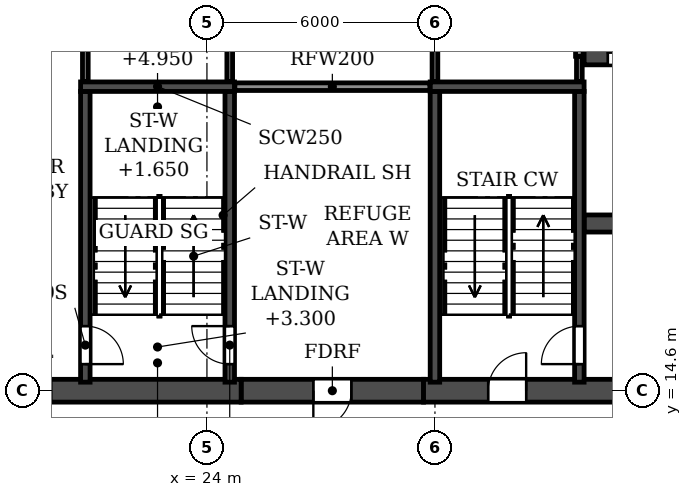
"""IFC4 building model, lengths in metres.
Left out: names, types, materials, properties, quantities, classifications, styles, units other than length and angle.
Written with IfcOpenShell. Run it as: python <this file> out.ifc"""

import sys

from ifc_helpers import new_model, si_unit, direction, frame, frame_2d, origin, place, context, subcontext, project, spatial, rectangle, extrude, element, fill, save


model = new_model("IFC4")
c1 = context("Model", 3, precision=1e-05, world=origin(), true_north=direction((0.0, 1.0)))
c2 = subcontext(c1, "Body", "Model", "MODEL_VIEW")
j1 = project(units=[si_unit("LENGTHUNIT", "METRE"), si_unit("PLANEANGLEUNIT", "RADIAN")], contexts=[c1])
p1 = place(None, origin())
s1 = spatial("IfcSite", under=j1, at=p1, CompositionType="ELEMENT")
p2 = place(p1, origin())
s2 = spatial("IfcBuilding", under=s1, at=p2, CompositionType="ELEMENT")
p3 = place(p2, frame((0.0, 0.0, 165.3)))
s3 = spatial("IfcBuildingStorey", under=s2, at=p3, CompositionType="ELEMENT", Elevation=165.3)
p4 = place(p3, frame((24.9, 14.6, 0.0), z_axis=(0.0, 0.0, 1.0), x_axis=(1.0, 0.0, 0.0)))
e1 = element("IfcWall", 1, at=p4, inside=s3, PredefinedType="SHEAR", context=c2, shape_type="SweptSolid", body=[
    extrude(rectangle(XDim=4.8, YDim=0.6, at=frame_2d((2.4, 0.0))), origin(), (0.0, 0.0, 1.0), 6.38),
])
p5 = place(p4, frame((1.9, 0.0, 0.0)))
e2 = element("IfcOpeningElement", 2, at=p5, cuts=e1, PredefinedType="OPENING", context=c2, shape_type="SweptSolid", body=[
    extrude(rectangle(XDim=1.0, YDim=2.1, at=frame_2d((0.5, 1.05))), frame((0.0, 0.31, 0.0), z_axis=(0.0, -1.0, 0.0), x_axis=(1.0, 0.0, 0.0)), (0.0, 0.0, 1.0), 0.62),
])
p6 = place(p3, frame((18.2, 14.6, 0.0), z_axis=(0.0, 0.0, 1.0), x_axis=(1.0, 0.0, 0.0)))
e3 = element("IfcWall", 3, at=p6, inside=s3, PredefinedType="SOLIDWALL", context=c2, shape_type="SweptSolid", body=[
    extrude(rectangle(XDim=6.7, YDim=0.6, at=frame_2d((3.35, 0.0))), origin(), (0.0, 0.0, 1.0), 6.38),
])
p7 = place(p6, frame((0.7, 0.0, 0.0)))
e4 = element("IfcOpeningElement", 4, at=p7, cuts=e3, PredefinedType="OPENING", context=c2, shape_type="SweptSolid", body=[
    extrude(rectangle(XDim=1.0, YDim=2.1, at=frame_2d((0.5, 1.05))), frame((0.0, 0.31, 0.0), z_axis=(0.0, -1.0, 0.0), x_axis=(1.0, 0.0, 0.0)), (0.0, 0.0, 1.0), 0.62),
])
p8 = place(p3, frame((29.7, 14.6, 0.0), z_axis=(0.0, 0.0, 1.0), x_axis=(1.0, 0.0, 0.0)))
e5 = element("IfcWall", 5, at=p8, inside=s3, PredefinedType="SOLIDWALL", context=c2, shape_type="SweptSolid", body=[
    extrude(rectangle(XDim=42.6, YDim=0.6, at=frame_2d((21.3, 0.0))), origin(), (0.0, 0.0, 1.0), 6.38),
])
p9 = place(p8, frame((1.7, 0.0, 0.0)))
e6 = element("IfcOpeningElement", 6, at=p9, cuts=e5, PredefinedType="OPENING", context=c2, shape_type="SweptSolid", body=[
    extrude(rectangle(XDim=1.0, YDim=2.1, at=frame_2d((0.5, 1.05))), frame((0.0, 0.31, 0.0), z_axis=(0.0, -1.0, 0.0), x_axis=(1.0, 0.0, 0.0)), (0.0, 0.0, 1.0), 0.62),
])
p10 = place(p8, frame((13.0, 0.0, 0.0)))
e7 = element("IfcOpeningElement", 7, at=p10, cuts=e5, PredefinedType="OPENING", context=c2, shape_type="SweptSolid", body=[
    extrude(rectangle(XDim=1.0, YDim=2.1, at=frame_2d((0.5, 1.05))), frame((0.0, 0.31, 0.0), z_axis=(0.0, -1.0, 0.0), x_axis=(1.0, 0.0, 0.0)), (0.0, 0.0, 1.0), 0.62),
])
p11 = place(p8, frame((16.9, 0.0, 0.0)))
e8 = element("IfcOpeningElement", 8, at=p11, cuts=e5, PredefinedType="OPENING", context=c2, shape_type="SweptSolid", body=[
    extrude(rectangle(XDim=1.0, YDim=2.1, at=frame_2d((0.5, 1.05))), frame((0.0, 0.31, 0.0), z_axis=(0.0, -1.0, 0.0), x_axis=(1.0, 0.0, 0.0)), (0.0, 0.0, 1.0), 0.62),
])
p12 = place(p8, frame((20.8, 0.0, 0.0)))
e9 = element("IfcOpeningElement", 9, at=p12, cuts=e5, PredefinedType="OPENING", context=c2, shape_type="SweptSolid", body=[
    extrude(rectangle(XDim=1.0, YDim=2.1, at=frame_2d((0.5, 1.05))), frame((0.0, 0.31, 0.0), z_axis=(0.0, -1.0, 0.0), x_axis=(1.0, 0.0, 0.0)), (0.0, 0.0, 1.0), 0.62),
])
p13 = place(p8, frame((24.7, 0.0, 0.0)))
e10 = element("IfcOpeningElement", 10, at=p13, cuts=e5, PredefinedType="OPENING", context=c2, shape_type="SweptSolid", body=[
    extrude(rectangle(XDim=1.0, YDim=2.1, at=frame_2d((0.5, 1.05))), frame((0.0, 0.31, 0.0), z_axis=(0.0, -1.0, 0.0), x_axis=(1.0, 0.0, 0.0)), (0.0, 0.0, 1.0), 0.62),
])
p14 = place(p8, frame((28.6, 0.0, 0.0)))
e11 = element("IfcOpeningElement", 11, at=p14, cuts=e5, PredefinedType="OPENING", context=c2, shape_type="SweptSolid", body=[
    extrude(rectangle(XDim=1.0, YDim=2.1, at=frame_2d((0.5, 1.05))), frame((0.0, 0.31, 0.0), z_axis=(0.0, -1.0, 0.0), x_axis=(1.0, 0.0, 0.0)), (0.0, 0.0, 1.0), 0.62),
])
p15 = place(p8, frame((39.9, 0.0, 0.0)))
e12 = element("IfcOpeningElement", 12, at=p15, cuts=e5, PredefinedType="OPENING", context=c2, shape_type="SweptSolid", body=[
    extrude(rectangle(XDim=1.0, YDim=2.1, at=frame_2d((0.5, 1.05))), frame((0.0, 0.31, 0.0), z_axis=(0.0, -1.0, 0.0), x_axis=(1.0, 0.0, 0.0)), (0.0, 0.0, 1.0), 0.62),
])
p16 = place(p3, frame((33.925, 19.0, 0.0), z_axis=(0.0, 0.0, 1.0), x_axis=(1.0, 0.0, 0.0)))
e13 = element("IfcWall", 13, at=p16, inside=s3, PredefinedType="SOLIDWALL", context=c2, shape_type="SweptSolid", body=[
    extrude(rectangle(XDim=34.15, YDim=0.45, at=frame_2d((17.075, 0.0))), origin(), (0.0, 0.0, 1.0), 6.38),
])
p17 = place(p16, frame((16.175, 0.0, 0.0)))
e14 = element("IfcOpeningElement", 14, at=p17, cuts=e13, PredefinedType="OPENING", context=c2, shape_type="SweptSolid", body=[
    extrude(rectangle(XDim=1.8, YDim=2.1, at=frame_2d((0.9, 1.05))), frame((0.0, 0.235, 0.0), z_axis=(0.0, -1.0, 0.0), x_axis=(1.0, 0.0, 0.0)), (0.0, 0.0, 1.0), 0.47),
])
p18 = place(p16, frame((1.525, 0.0, 0.0)))
e15 = element("IfcOpeningElement", 15, at=p18, cuts=e13, PredefinedType="OPENING", context=c2, shape_type="SweptSolid", body=[
    extrude(rectangle(XDim=1.8, YDim=2.1, at=frame_2d((0.9, 1.05))), frame((0.0, 0.235, 0.0), z_axis=(0.0, -1.0, 0.0), x_axis=(1.0, 0.0, 0.0)), (0.0, 0.0, 1.0), 0.47),
])
p19 = place(p16, frame((30.825, 0.0, 0.0)))
e16 = element("IfcOpeningElement", 16, at=p19, cuts=e13, PredefinedType="OPENING", context=c2, shape_type="SweptSolid", body=[
    extrude(rectangle(XDim=1.8, YDim=2.1, at=frame_2d((0.9, 1.05))), frame((0.0, 0.235, 0.0), z_axis=(0.0, -1.0, 0.0), x_axis=(1.0, 0.0, 0.0)), (0.0, 0.0, 1.0), 0.47),
])
p20 = place(p3, frame((33.925, 23.4, 0.0), z_axis=(0.0, 0.0, 1.0), x_axis=(1.0, 0.0, 0.0)))
e17 = element("IfcWall", 17, at=p20, inside=s3, PredefinedType="SOLIDWALL", context=c2, shape_type="SweptSolid", body=[
    extrude(rectangle(XDim=34.15, YDim=0.45, at=frame_2d((17.075, 0.0))), origin(), (0.0, 0.0, 1.0), 6.38),
])
p21 = place(p20, frame((16.175, 0.0, 0.0)))
e18 = element("IfcOpeningElement", 18, at=p21, cuts=e17, PredefinedType="OPENING", context=c2, shape_type="SweptSolid", body=[
    extrude(rectangle(XDim=1.8, YDim=2.1, at=frame_2d((0.9, 1.05))), frame((0.0, 0.235, 0.0), z_axis=(0.0, -1.0, 0.0), x_axis=(1.0, 0.0, 0.0)), (0.0, 0.0, 1.0), 0.47),
])
p22 = place(p20, frame((0.625, 0.0, 0.0)))
e19 = element("IfcOpeningElement", 19, at=p22, cuts=e17, PredefinedType="OPENING", context=c2, shape_type="SweptSolid", body=[
    extrude(rectangle(XDim=1.1, YDim=2.1, at=frame_2d((0.55, 1.05))), frame((0.0, 0.235, 0.0), z_axis=(0.0, -1.0, 0.0), x_axis=(1.0, 0.0, 0.0)), (0.0, 0.0, 1.0), 0.47),
])
p23 = place(p20, frame((3.225, 0.0, 0.0)))
e20 = element("IfcOpeningElement", 20, at=p23, cuts=e17, PredefinedType="OPENING", context=c2, shape_type="SweptSolid", body=[
    extrude(rectangle(XDim=1.1, YDim=2.1, at=frame_2d((0.55, 1.05))), frame((0.0, 0.235, 0.0), z_axis=(0.0, -1.0, 0.0), x_axis=(1.0, 0.0, 0.0)), (0.0, 0.0, 1.0), 0.47),
])
p24 = place(p20, frame((5.825, 0.0, 0.0)))
e21 = element("IfcOpeningElement", 21, at=p24, cuts=e17, PredefinedType="OPENING", context=c2, shape_type="SweptSolid", body=[
    extrude(rectangle(XDim=1.1, YDim=2.1, at=frame_2d((0.55, 1.05))), frame((0.0, 0.235, 0.0), z_axis=(0.0, -1.0, 0.0), x_axis=(1.0, 0.0, 0.0)), (0.0, 0.0, 1.0), 0.47),
])
p25 = place(p20, frame((8.425, 0.0, 0.0)))
e22 = element("IfcOpeningElement", 22, at=p25, cuts=e17, PredefinedType="OPENING", context=c2, shape_type="SweptSolid", body=[
    extrude(rectangle(XDim=1.1, YDim=2.1, at=frame_2d((0.55, 1.05))), frame((0.0, 0.235, 0.0), z_axis=(0.0, -1.0, 0.0), x_axis=(1.0, 0.0, 0.0)), (0.0, 0.0, 1.0), 0.47),
])
p26 = place(p20, frame((11.025, 0.0, 0.0)))
e23 = element("IfcOpeningElement", 23, at=p26, cuts=e17, PredefinedType="OPENING", context=c2, shape_type="SweptSolid", body=[
    extrude(rectangle(XDim=1.1, YDim=2.1, at=frame_2d((0.55, 1.05))), frame((0.0, 0.235, 0.0), z_axis=(0.0, -1.0, 0.0), x_axis=(1.0, 0.0, 0.0)), (0.0, 0.0, 1.0), 0.47),
])
p27 = place(p20, frame((13.625, 0.0, 0.0)))
e24 = element("IfcOpeningElement", 24, at=p27, cuts=e17, PredefinedType="OPENING", context=c2, shape_type="SweptSolid", body=[
    extrude(rectangle(XDim=1.1, YDim=2.1, at=frame_2d((0.55, 1.05))), frame((0.0, 0.235, 0.0), z_axis=(0.0, -1.0, 0.0), x_axis=(1.0, 0.0, 0.0)), (0.0, 0.0, 1.0), 0.47),
])
p28 = place(p20, frame((27.225, 0.0, 0.0)))
e25 = element("IfcOpeningElement", 25, at=p28, cuts=e17, PredefinedType="OPENING", context=c2, shape_type="SweptSolid", body=[
    extrude(rectangle(XDim=1.1, YDim=2.1, at=frame_2d((0.55, 1.05))), frame((0.0, 0.235, 0.0), z_axis=(0.0, -1.0, 0.0), x_axis=(1.0, 0.0, 0.0)), (0.0, 0.0, 1.0), 0.47),
])
p29 = place(p3, frame((30.0, 14.825, 0.0), z_axis=(0.0, 0.0, 1.0), x_axis=(0.0, 1.0, 0.0)))
e26 = element("IfcWall", 26, at=p29, inside=s3, PredefinedType="SOLIDWALL", context=c2, shape_type="SweptSolid", body=[
    extrude(rectangle(XDim=7.65, YDim=0.25, at=frame_2d((3.825, 0.0))), origin(), (0.0, 0.0, 1.0), 6.38),
])
p30 = place(p3, frame((33.8, 14.825, 0.0), z_axis=(0.0, 0.0, 1.0), x_axis=(0.0, 1.0, 0.0)))
e27 = element("IfcWall", 27, at=p30, inside=s3, PredefinedType="SOLIDWALL", context=c2, shape_type="SweptSolid", body=[
    extrude(rectangle(XDim=7.65, YDim=0.25, at=frame_2d((3.825, 0.0))), origin(), (0.0, 0.0, 1.0), 6.38),
])
p31 = place(p30, frame((0.475, 0.0, 0.0)))
e28 = element("IfcOpeningElement", 28, at=p31, cuts=e27, PredefinedType="OPENING", context=c2, shape_type="SweptSolid", body=[
    extrude(rectangle(XDim=1.0, YDim=2.1, at=frame_2d((0.5, 1.05))), frame((0.0, 0.135, 0.0), z_axis=(0.0, -1.0, 0.0), x_axis=(1.0, 0.0, 0.0)), (0.0, 0.0, 1.0), 0.27),
])
p32 = place(p3, frame((29.875, 22.6, 0.0), z_axis=(0.0, 0.0, 1.0), x_axis=(1.0, 0.0, 0.0)))
e29 = element("IfcWall", 29, at=p32, inside=s3, PredefinedType="SOLIDWALL", context=c2, shape_type="SweptSolid", body=[
    extrude(rectangle(XDim=4.05, YDim=0.25, at=frame_2d((2.025, 0.0))), origin(), (0.0, 0.0, 1.0), 6.38),
])
p33 = place(p3, frame((20.8, 14.825, 0.0), z_axis=(0.0, 0.0, 1.0), x_axis=(0.0, 1.0, 0.0)))
e30 = element("IfcWall", 30, at=p33, inside=s3, PredefinedType="SOLIDWALL", context=c2, shape_type="SweptSolid", body=[
    extrude(rectangle(XDim=7.65, YDim=0.25, at=frame_2d((3.825, 0.0))), origin(), (0.0, 0.0, 1.0), 6.38),
])
p34 = place(p33, frame((0.475, 0.0, 0.0)))
e31 = element("IfcOpeningElement", 31, at=p34, cuts=e30, PredefinedType="OPENING", context=c2, shape_type="SweptSolid", body=[
    extrude(rectangle(XDim=1.0, YDim=2.1, at=frame_2d((0.5, 1.05))), frame((0.0, 0.135, 0.0), z_axis=(0.0, -1.0, 0.0), x_axis=(1.0, 0.0, 0.0)), (0.0, 0.0, 1.0), 0.27),
])
p35 = place(p3, frame((24.6, 14.825, 0.0), z_axis=(0.0, 0.0, 1.0), x_axis=(0.0, 1.0, 0.0)))
e32 = element("IfcWall", 32, at=p35, inside=s3, PredefinedType="SOLIDWALL", context=c2, shape_type="SweptSolid", body=[
    extrude(rectangle(XDim=7.65, YDim=0.25, at=frame_2d((3.825, 0.0))), origin(), (0.0, 0.0, 1.0), 6.38),
])
p36 = place(p35, frame((0.475, 0.0, 0.0)))
e33 = element("IfcOpeningElement", 33, at=p36, cuts=e32, PredefinedType="OPENING", context=c2, shape_type="SweptSolid", body=[
    extrude(rectangle(XDim=1.0, YDim=2.1, at=frame_2d((0.5, 1.05))), frame((0.0, 0.135, 0.0), z_axis=(0.0, -1.0, 0.0), x_axis=(1.0, 0.0, 0.0)), (0.0, 0.0, 1.0), 0.27),
])
p37 = place(p3, frame((20.675, 22.6, 0.0), z_axis=(0.0, 0.0, 1.0), x_axis=(1.0, 0.0, 0.0)))
e34 = element("IfcWall", 34, at=p37, inside=s3, PredefinedType="SOLIDWALL", context=c2, shape_type="SweptSolid", body=[
    extrude(rectangle(XDim=4.05, YDim=0.25, at=frame_2d((2.025, 0.0))), origin(), (0.0, 0.0, 1.0), 6.38),
])
p38 = place(p3, frame((24.735, 22.6, 0.0), z_axis=(0.0, 0.0, 1.0), x_axis=(1.0, 0.0, 0.0)))
e35 = element("IfcWall", 35, at=p38, inside=s3, PredefinedType="PARTITIONING", context=c2, shape_type="SweptSolid", body=[
    extrude(rectangle(XDim=5.13, YDim=0.2, at=frame_2d((2.565, 0.0))), origin(), (0.0, 0.0, 1.0), 6.38),
])
for number, where, z_axis, x_axis in (
    (36, (20.8, 22.735, 0.0), (0.0, 0.0, 1.0), (0.0, 1.0, 0.0)),
    (37, (24.6, 22.735, 0.0), (0.0, 0.0, 1.0), (0.0, 1.0, 0.0)),
    (38, (30.0, 22.735, 0.0), (0.0, 0.0, 1.0), (0.0, 1.0, 0.0)),
):
    element("IfcWall", number, at=place(p3, frame(where, z_axis=z_axis, x_axis=x_axis)), inside=s3, PredefinedType="PARTITIONING", context=c2, shape_type="SweptSolid", body=[
        extrude(rectangle(XDim=4.755, YDim=0.15, at=frame_2d((2.377, 0.0))), origin(), (0.0, 0.0, 1.0), 6.38),
    ])
p39 = place(p3, frame((33.8, 22.735, 0.0), z_axis=(0.0, 0.0, 1.0), x_axis=(0.0, 1.0, 0.0)))
e39 = element("IfcWall", 39, at=p39, inside=s3, PredefinedType="PARTITIONING", context=c2, shape_type="SweptSolid", body=[
    extrude(rectangle(XDim=0.665, YDim=0.15, at=frame_2d((0.333, 0.0))), origin(), (0.0, 0.0, 1.0), 6.38),
])
p40 = place(p3, frame((33.8, 23.4, 0.0), z_axis=(0.0, 0.0, 1.0), x_axis=(0.0, 1.0, 0.0)))
e40 = element("IfcWall", 40, at=p40, inside=s3, PredefinedType="PARTITIONING", context=c2, shape_type="SweptSolid", body=[
    extrude(rectangle(XDim=2.7, YDim=0.2, at=frame_2d((1.35, 0.0))), origin(), (0.0, 0.0, 1.0), 6.38),
])
p41 = place(p5, frame((1.0, 0.0, 0.0), z_axis=(0.0, 0.0, 1.0), x_axis=(-1.0, 0.0, 0.0)))
e41 = element("IfcDoor", 41, at=p41, inside=s3, OperationType="SINGLE_SWING_RIGHT", PredefinedType="DOOR", context=c2, shape_type="SweptSolid", body=[
    extrude(rectangle(XDim=1.0, YDim=2.1, at=frame_2d((0.5, 1.05))), frame((0.0, 0.025, 0.0), z_axis=(0.0, -1.0, 0.0), x_axis=(1.0, 0.0, 0.0)), (0.0, 0.0, 1.0), 0.05),
])
fill(e2, e41)
p42 = place(p9, origin())
e42 = element("IfcDoor", 42, at=p42, inside=s3, OperationType="SINGLE_SWING_RIGHT", PredefinedType="DOOR", context=c2, shape_type="SweptSolid", body=[
    extrude(rectangle(XDim=1.0, YDim=2.1, at=frame_2d((0.5, 1.05))), frame((0.0, 0.025, 0.0), z_axis=(0.0, -1.0, 0.0), x_axis=(1.0, 0.0, 0.0)), (0.0, 0.0, 1.0), 0.05),
])
fill(e6, e42)
p43 = place(p31, origin())
e43 = element("IfcDoor", 43, at=p43, inside=s3, OperationType="SINGLE_SWING_LEFT", PredefinedType="DOOR", context=c2, shape_type="SweptSolid", body=[
    extrude(rectangle(XDim=1.0, YDim=2.1, at=frame_2d((0.5, 1.05))), frame((0.0, 0.025, 0.0), z_axis=(0.0, -1.0, 0.0), x_axis=(1.0, 0.0, 0.0)), (0.0, 0.0, 1.0), 0.05),
])
fill(e28, e43)
p44 = place(p22, origin())
e44 = element("IfcDoor", 44, at=p44, inside=s3, OperationType="DOUBLE_DOOR_SLIDING", PredefinedType="DOOR", context=c2, shape_type="SweptSolid", body=[
    extrude(rectangle(XDim=1.1, YDim=2.1, at=frame_2d((0.55, 1.05))), frame((0.0, 0.025, 0.0), z_axis=(0.0, -1.0, 0.0), x_axis=(1.0, 0.0, 0.0)), (0.0, 0.0, 1.0), 0.05),
])
fill(e19, e44)
p45 = place(p36, origin())
e45 = element("IfcDoor", 45, at=p45, inside=s3, OperationType="SINGLE_SWING_RIGHT", PredefinedType="DOOR", context=c2, shape_type="SweptSolid", body=[
    extrude(rectangle(XDim=1.0, YDim=2.1, at=frame_2d((0.5, 1.05))), frame((0.0, 0.025, 0.0), z_axis=(0.0, -1.0, 0.0), x_axis=(1.0, 0.0, 0.0)), (0.0, 0.0, 1.0), 0.05),
])
fill(e33, e45)
p46 = place(p34, frame((1.0, 0.0, 0.0), z_axis=(0.0, 0.0, 1.0), x_axis=(-1.0, 0.0, 0.0)))
e46 = element("IfcDoor", 46, at=p46, inside=s3, OperationType="SINGLE_SWING_RIGHT", PredefinedType="DOOR", context=c2, shape_type="SweptSolid", body=[
    extrude(rectangle(XDim=1.0, YDim=2.1, at=frame_2d((0.5, 1.05))), frame((0.0, 0.025, 0.0), z_axis=(0.0, -1.0, 0.0), x_axis=(1.0, 0.0, 0.0)), (0.0, 0.0, 1.0), 0.05),
])
fill(e31, e46)
save(model, sys.argv[1])
